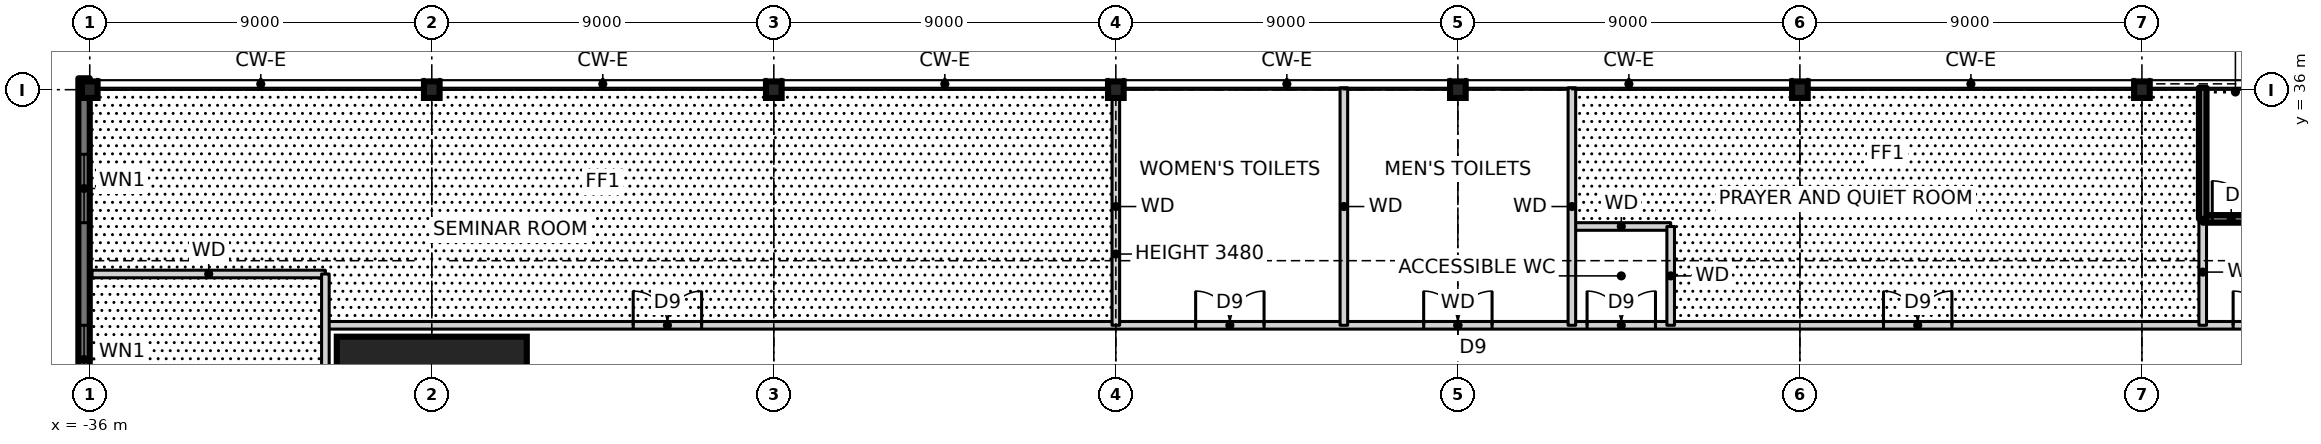
"""IFC4 building model, lengths in metres.
Left out: names, types, materials, properties, quantities, classifications, styles, units other than length and angle.
Written with IfcOpenShell. Run it as: python <this file> out.ifc"""

import sys

from ifc_helpers import new_model, si_unit, direction, frame, frame_2d, origin, origin_2d, place, context, subcontext, project, spatial, rectangle, i_section, extrude, element, fill, save


model = new_model("IFC4")
c1 = context("Model", 3, precision=1e-05, world=origin(), true_north=direction((0.0, 1.0)))
c2 = subcontext(c1, "Body", "Model", "MODEL_VIEW")
j1 = project(units=[si_unit("LENGTHUNIT", "METRE"), si_unit("PLANEANGLEUNIT", "RADIAN")], contexts=[c1])
p1 = place(None, origin())
s1 = spatial("IfcSite", under=j1, at=p1, CompositionType="ELEMENT")
p2 = place(p1, origin())
s2 = spatial("IfcBuilding", under=s1, at=p2, CompositionType="ELEMENT")
p3 = place(p2, frame((0.0, 0.0, 6.0)))
s3 = spatial("IfcBuildingStorey", under=s2, at=p3, CompositionType="ELEMENT", Elevation=6.0)
p4 = place(p3, frame((-27.0, 27.0, 0.0), z_axis=(0.0, 0.0, 1.0), x_axis=(1.0, 0.0, 0.0)))
e1 = element("IfcColumn", 1, at=p4, inside=s3, PredefinedType="COLUMN", context=c2, shape_type="SweptSolid", body=[
    extrude(rectangle(XDim=5.0, YDim=5.0, at=origin_2d()), origin(), (0.0, 0.0, 1.0), 4.5),
    extrude(i_section(OverallWidth=0.478, OverallDepth=0.599, WebThickness=0.1, FlangeThickness=0.14, at=origin_2d()), origin(), (0.0, 0.0, 1.0), 4.5),
])
for number, where, z_axis, x_axis in (
    (2, (-36.0, 36.0, 0.0), (0.0, 0.0, 1.0), (1.0, 0.0, 0.0)),
    (3, (-27.0, 36.0, 0.0), (0.0, 0.0, 1.0), (1.0, 0.0, 0.0)),
    (4, (-18.0, 36.0, 0.0), (0.0, 0.0, 1.0), (1.0, 0.0, 0.0)),
    (5, (-9.0, 36.0, 0.0), (0.0, 0.0, 1.0), (1.0, 0.0, 0.0)),
    (6, (0.0, 36.0, 0.0), (0.0, 0.0, 1.0), (1.0, 0.0, 0.0)),
    (7, (9.0, 36.0, 0.0), (0.0, 0.0, 1.0), (1.0, 0.0, 0.0)),
    (8, (18.0, 36.0, 0.0), (0.0, 0.0, 1.0), (1.0, 0.0, 0.0)),
):
    element("IfcColumn", number, at=place(p3, frame(where, z_axis=z_axis, x_axis=x_axis)), inside=s3, PredefinedType="COLUMN", context=c2, shape_type="SweptSolid", body=[
        extrude(i_section(OverallWidth=0.411, OverallDepth=0.434, WebThickness=0.036, FlangeThickness=0.057, at=origin_2d()), origin(), (0.0, 0.0, 1.0), 4.5),
    ])
p5 = place(p3, frame((-36.15, 36.3, -0.25), z_axis=(0.0, 0.0, 1.0), x_axis=(0.0, -1.0, 0.0)))
e9 = element("IfcWall", 9, at=p5, inside=s3, PredefinedType="SOLIDWALL", context=c2, shape_type="SweptSolid", body=[
    extrude(rectangle(XDim=72.6, YDim=0.3, at=frame_2d((36.3, 0.0))), origin(), (0.0, 0.0, 1.0), 3.73),
])
p6 = place(p5, frame((2.0, 0.0, 1.15)))
e10 = element("IfcOpeningElement", 10, at=p6, cuts=e9, PredefinedType="OPENING", context=c2, shape_type="SweptSolid", body=[
    extrude(rectangle(XDim=1.8, YDim=2.4, at=frame_2d((0.9, 1.2))), frame((0.0, 0.16, 0.0), z_axis=(0.0, -1.0, 0.0), x_axis=(1.0, 0.0, 0.0)), (0.0, 0.0, 1.0), 0.32),
])
p7 = place(p5, frame((6.5, 0.0, 1.15)))
e11 = element("IfcOpeningElement", 11, at=p7, cuts=e9, PredefinedType="OPENING", context=c2, shape_type="SweptSolid", body=[
    extrude(rectangle(XDim=1.8, YDim=2.4, at=frame_2d((0.9, 1.2))), frame((0.0, 0.16, 0.0), z_axis=(0.0, -1.0, 0.0), x_axis=(1.0, 0.0, 0.0)), (0.0, 0.0, 1.0), 0.32),
])
p8 = place(p5, frame((11.0, 0.0, 1.15)))
e12 = element("IfcOpeningElement", 12, at=p8, cuts=e9, PredefinedType="OPENING", context=c2, shape_type="SweptSolid", body=[
    extrude(rectangle(XDim=1.8, YDim=2.4, at=frame_2d((0.9, 1.2))), frame((0.0, 0.16, 0.0), z_axis=(0.0, -1.0, 0.0), x_axis=(1.0, 0.0, 0.0)), (0.0, 0.0, 1.0), 0.32),
])
p9 = place(p5, frame((15.5, 0.0, 1.15)))
e13 = element("IfcOpeningElement", 13, at=p9, cuts=e9, PredefinedType="OPENING", context=c2, shape_type="SweptSolid", body=[
    extrude(rectangle(XDim=1.8, YDim=2.4, at=frame_2d((0.9, 1.2))), frame((0.0, 0.16, 0.0), z_axis=(0.0, -1.0, 0.0), x_axis=(1.0, 0.0, 0.0)), (0.0, 0.0, 1.0), 0.32),
])
p10 = place(p5, frame((20.0, 0.0, 1.15)))
e14 = element("IfcOpeningElement", 14, at=p10, cuts=e9, PredefinedType="OPENING", context=c2, shape_type="SweptSolid", body=[
    extrude(rectangle(XDim=1.8, YDim=2.4, at=frame_2d((0.9, 1.2))), frame((0.0, 0.16, 0.0), z_axis=(0.0, -1.0, 0.0), x_axis=(1.0, 0.0, 0.0)), (0.0, 0.0, 1.0), 0.32),
])
p11 = place(p5, frame((24.5, 0.0, 1.15)))
e15 = element("IfcOpeningElement", 15, at=p11, cuts=e9, PredefinedType="OPENING", context=c2, shape_type="SweptSolid", body=[
    extrude(rectangle(XDim=1.8, YDim=2.4, at=frame_2d((0.9, 1.2))), frame((0.0, 0.16, 0.0), z_axis=(0.0, -1.0, 0.0), x_axis=(1.0, 0.0, 0.0)), (0.0, 0.0, 1.0), 0.32),
])
p12 = place(p5, frame((29.0, 0.0, 1.15)))
e16 = element("IfcOpeningElement", 16, at=p12, cuts=e9, PredefinedType="OPENING", context=c2, shape_type="SweptSolid", body=[
    extrude(rectangle(XDim=1.8, YDim=2.4, at=frame_2d((0.9, 1.2))), frame((0.0, 0.16, 0.0), z_axis=(0.0, -1.0, 0.0), x_axis=(1.0, 0.0, 0.0)), (0.0, 0.0, 1.0), 0.32),
])
p13 = place(p5, frame((42.5, 0.0, 1.15)))
e17 = element("IfcOpeningElement", 17, at=p13, cuts=e9, PredefinedType="OPENING", context=c2, shape_type="SweptSolid", body=[
    extrude(rectangle(XDim=1.8, YDim=2.4, at=frame_2d((0.9, 1.2))), frame((0.0, 0.16, 0.0), z_axis=(0.0, -1.0, 0.0), x_axis=(1.0, 0.0, 0.0)), (0.0, 0.0, 1.0), 0.32),
])
p14 = place(p5, frame((47.0, 0.0, 1.15)))
e18 = element("IfcOpeningElement", 18, at=p14, cuts=e9, PredefinedType="OPENING", context=c2, shape_type="SweptSolid", body=[
    extrude(rectangle(XDim=1.8, YDim=2.4, at=frame_2d((0.9, 1.2))), frame((0.0, 0.16, 0.0), z_axis=(0.0, -1.0, 0.0), x_axis=(1.0, 0.0, 0.0)), (0.0, 0.0, 1.0), 0.32),
])
p15 = place(p5, frame((51.5, 0.0, 1.15)))
e19 = element("IfcOpeningElement", 19, at=p15, cuts=e9, PredefinedType="OPENING", context=c2, shape_type="SweptSolid", body=[
    extrude(rectangle(XDim=1.8, YDim=2.4, at=frame_2d((0.9, 1.2))), frame((0.0, 0.16, 0.0), z_axis=(0.0, -1.0, 0.0), x_axis=(1.0, 0.0, 0.0)), (0.0, 0.0, 1.0), 0.32),
])
p16 = place(p5, frame((56.0, 0.0, 1.15)))
e20 = element("IfcOpeningElement", 20, at=p16, cuts=e9, PredefinedType="OPENING", context=c2, shape_type="SweptSolid", body=[
    extrude(rectangle(XDim=1.8, YDim=2.4, at=frame_2d((0.9, 1.2))), frame((0.0, 0.16, 0.0), z_axis=(0.0, -1.0, 0.0), x_axis=(1.0, 0.0, 0.0)), (0.0, 0.0, 1.0), 0.32),
])
p17 = place(p5, frame((60.5, 0.0, 1.15)))
e21 = element("IfcOpeningElement", 21, at=p17, cuts=e9, PredefinedType="OPENING", context=c2, shape_type="SweptSolid", body=[
    extrude(rectangle(XDim=1.8, YDim=2.4, at=frame_2d((0.9, 1.2))), frame((0.0, 0.16, 0.0), z_axis=(0.0, -1.0, 0.0), x_axis=(1.0, 0.0, 0.0)), (0.0, 0.0, 1.0), 0.32),
])
p18 = place(p5, frame((65.0, 0.0, 1.15)))
e22 = element("IfcOpeningElement", 22, at=p18, cuts=e9, PredefinedType="OPENING", context=c2, shape_type="SweptSolid", body=[
    extrude(rectangle(XDim=1.8, YDim=2.4, at=frame_2d((0.9, 1.2))), frame((0.0, 0.16, 0.0), z_axis=(0.0, -1.0, 0.0), x_axis=(1.0, 0.0, 0.0)), (0.0, 0.0, 1.0), 0.32),
])
p19 = place(p5, frame((69.5, 0.0, 1.15)))
e23 = element("IfcOpeningElement", 23, at=p19, cuts=e9, PredefinedType="OPENING", context=c2, shape_type="SweptSolid", body=[
    extrude(rectangle(XDim=1.8, YDim=2.4, at=frame_2d((0.9, 1.2))), frame((0.0, 0.16, 0.0), z_axis=(0.0, -1.0, 0.0), x_axis=(1.0, 0.0, 0.0)), (0.0, 0.0, 1.0), 0.32),
])
p20 = place(p3, frame((-29.8, 29.8, 0.0), z_axis=(0.0, 0.0, 1.0), x_axis=(1.0, 0.0, 0.0)))
e24 = element("IfcWall", 24, at=p20, inside=s3, PredefinedType="SOLIDWALL", context=c2, shape_type="SweptSolid", body=[
    extrude(rectangle(XDim=59.6, YDim=0.2, at=frame_2d((29.8, 0.0))), origin(), (0.0, 0.0, 1.0), 4.25),
])
p21 = place(p20, frame((8.1, 0.0, 0.0)))
e25 = element("IfcOpeningElement", 25, at=p21, cuts=e24, PredefinedType="OPENING", context=c2, shape_type="SweptSolid", body=[
    extrude(rectangle(XDim=1.8, YDim=2.1, at=frame_2d((0.9, 1.05))), frame((0.0, 0.11, 0.0), z_axis=(0.0, -1.0, 0.0), x_axis=(1.0, 0.0, 0.0)), (0.0, 0.0, 1.0), 0.22),
])
p22 = place(p20, frame((22.9, 0.0, 0.0)))
e26 = element("IfcOpeningElement", 26, at=p22, cuts=e24, PredefinedType="OPENING", context=c2, shape_type="SweptSolid", body=[
    extrude(rectangle(XDim=1.8, YDim=2.1, at=frame_2d((0.9, 1.05))), frame((0.0, 0.11, 0.0), z_axis=(0.0, -1.0, 0.0), x_axis=(1.0, 0.0, 0.0)), (0.0, 0.0, 1.0), 0.22),
])
p23 = place(p20, frame((28.9, 0.0, 0.0)))
e27 = element("IfcOpeningElement", 27, at=p23, cuts=e24, PredefinedType="OPENING", context=c2, shape_type="SweptSolid", body=[
    extrude(rectangle(XDim=1.8, YDim=2.1, at=frame_2d((0.9, 1.05))), frame((0.0, 0.11, 0.0), z_axis=(0.0, -1.0, 0.0), x_axis=(1.0, 0.0, 0.0)), (0.0, 0.0, 1.0), 0.22),
])
p24 = place(p20, frame((33.2, 0.0, 0.0)))
e28 = element("IfcOpeningElement", 28, at=p24, cuts=e24, PredefinedType="OPENING", context=c2, shape_type="SweptSolid", body=[
    extrude(rectangle(XDim=1.8, YDim=2.1, at=frame_2d((0.9, 1.05))), frame((0.0, 0.11, 0.0), z_axis=(0.0, -1.0, 0.0), x_axis=(1.0, 0.0, 0.0)), (0.0, 0.0, 1.0), 0.22),
])
p25 = place(p20, frame((41.0, 0.0, 0.0)))
e29 = element("IfcOpeningElement", 29, at=p25, cuts=e24, PredefinedType="OPENING", context=c2, shape_type="SweptSolid", body=[
    extrude(rectangle(XDim=1.8, YDim=2.1, at=frame_2d((0.9, 1.05))), frame((0.0, 0.11, 0.0), z_axis=(0.0, -1.0, 0.0), x_axis=(1.0, 0.0, 0.0)), (0.0, 0.0, 1.0), 0.22),
])
p26 = place(p20, frame((50.2, 0.0, 0.0)))
e30 = element("IfcOpeningElement", 30, at=p26, cuts=e24, PredefinedType="OPENING", context=c2, shape_type="SweptSolid", body=[
    extrude(rectangle(XDim=1.8, YDim=2.1, at=frame_2d((0.9, 1.05))), frame((0.0, 0.11, 0.0), z_axis=(0.0, -1.0, 0.0), x_axis=(1.0, 0.0, 0.0)), (0.0, 0.0, 1.0), 0.22),
])
p27 = place(p3, frame((-35.94, 31.15, 0.0), z_axis=(0.0, 0.0, 1.0), x_axis=(1.0, 0.0, 0.0)))
e31 = element("IfcWall", 31, at=p27, inside=s3, PredefinedType="SOLIDWALL", context=c2, shape_type="SweptSolid", body=[
    extrude(rectangle(XDim=6.14, YDim=0.2, at=frame_2d((3.07, 0.0))), origin(), (0.0, 0.0, 1.0), 4.25),
])
p28 = place(p3, frame((3.0, 32.4, 0.0), z_axis=(0.0, 0.0, 1.0), x_axis=(1.0, 0.0, 0.0)))
e32 = element("IfcWall", 32, at=p28, inside=s3, PredefinedType="SOLIDWALL", context=c2, shape_type="SweptSolid", body=[
    extrude(rectangle(XDim=2.6, YDim=0.2, at=frame_2d((1.3, 0.0))), origin(), (0.0, 0.0, 1.0), 4.25),
])
p29 = place(p3, frame((19.6, 32.6, 0.0), z_axis=(0.0, 0.0, 1.0), x_axis=(1.0, 0.0, 0.0)))
e33 = element("IfcWall", 33, at=p29, inside=s3, PredefinedType="SOLIDWALL", context=c2, shape_type="SweptSolid", body=[
    extrude(rectangle(XDim=7.4, YDim=0.2, at=frame_2d((3.7, 0.0))), origin(), (0.0, 0.0, 1.0), 4.5),
])
p30 = place(p29, frame((0.25, 0.0, 0.0)))
e34 = element("IfcOpeningElement", 34, at=p30, cuts=e33, PredefinedType="OPENING", context=c2, shape_type="SweptSolid", body=[
    extrude(rectangle(XDim=1.0, YDim=2.1, at=frame_2d((0.5, 1.05))), frame((0.0, 0.11, 0.0), z_axis=(0.0, -1.0, 0.0), x_axis=(1.0, 0.0, 0.0)), (0.0, 0.0, 1.0), 0.22),
])
p31 = place(p3, frame((19.6, 29.8, 0.0), z_axis=(0.0, 0.0, 1.0), x_axis=(0.0, 1.0, 0.0)))
e35 = element("IfcWall", 35, at=p31, inside=s3, PredefinedType="SOLIDWALL", context=c2, shape_type="SweptSolid", body=[
    extrude(rectangle(XDim=2.8, YDim=0.2, at=frame_2d((1.4, 0.0))), origin(), (0.0, 0.0, 1.0), 4.25),
])
p32 = place(p3, frame((19.6, 32.6, 0.0), z_axis=(0.0, 0.0, 1.0), x_axis=(0.0, 1.0, 0.0)))
e36 = element("IfcWall", 36, at=p32, inside=s3, PredefinedType="SOLIDWALL", context=c2, shape_type="SweptSolid", body=[
    extrude(rectangle(XDim=3.45, YDim=0.2, at=frame_2d((1.725, 0.0))), origin(), (0.0, 0.0, 1.0), 4.5),
])
p33 = place(p3, frame((5.6, 29.8, 0.0), z_axis=(0.0, 0.0, 1.0), x_axis=(0.0, 1.0, 0.0)))
e37 = element("IfcWall", 37, at=p33, inside=s3, PredefinedType="SOLIDWALL", context=c2, shape_type="SweptSolid", body=[
    extrude(rectangle(XDim=2.6, YDim=0.2, at=frame_2d((1.3, 0.0))), origin(), (0.0, 0.0, 1.0), 4.25),
])
for number, where, z_axis, x_axis in (
    (38, (3.0, 29.8, 0.0), (0.0, 0.0, 1.0), (0.0, 1.0, 0.0)),
    (39, (-3.0, 29.8, 0.0), (0.0, 0.0, 1.0), (0.0, 1.0, 0.0)),
):
    element("IfcWall", number, at=place(p3, frame(where, z_axis=z_axis, x_axis=x_axis)), inside=s3, PredefinedType="SOLIDWALL", context=c2, shape_type="SweptSolid", body=[
        extrude(rectangle(XDim=6.25, YDim=0.2, at=frame_2d((3.125, 0.0))), origin(), (0.0, 0.0, 1.0), 4.25),
    ])
p34 = place(p3, frame((-9.0, 29.8, 0.0), z_axis=(0.0, 0.0, 1.0), x_axis=(0.0, 1.0, 0.0)))
e40 = element("IfcWall", 40, at=p34, inside=s3, PredefinedType="SOLIDWALL", context=c2, shape_type="SweptSolid", body=[
    extrude(rectangle(XDim=6.25, YDim=0.2, at=frame_2d((3.125, 0.0))), origin(), (0.0, 0.0, 1.0), 3.48),
])
p35 = place(p3, frame((-29.8, -31.4, 0.0), z_axis=(0.0, 0.0, 1.0), x_axis=(0.0, 1.0, 0.0)))
e41 = element("IfcWall", 41, at=p35, inside=s3, PredefinedType="SOLIDWALL", context=c2, shape_type="SweptSolid", body=[
    extrude(rectangle(XDim=62.55, YDim=0.2, at=frame_2d((31.275, 0.0))), origin(), (0.0, 0.0, 1.0), 4.25),
])
p36 = place(p35, frame((8.9, 0.0, 0.0)))
e42 = element("IfcOpeningElement", 42, at=p36, cuts=e41, PredefinedType="OPENING", context=c2, shape_type="SweptSolid", body=[
    extrude(rectangle(XDim=1.8, YDim=2.1, at=frame_2d((0.9, 1.05))), frame((0.0, 0.11, 0.0), z_axis=(0.0, -1.0, 0.0), x_axis=(1.0, 0.0, 0.0)), (0.0, 0.0, 1.0), 0.22),
])
p37 = place(p35, frame((19.3, 0.0, 0.0)))
e43 = element("IfcOpeningElement", 43, at=p37, cuts=e41, PredefinedType="OPENING", context=c2, shape_type="SweptSolid", body=[
    extrude(rectangle(XDim=1.8, YDim=2.1, at=frame_2d((0.9, 1.05))), frame((0.0, 0.11, 0.0), z_axis=(0.0, -1.0, 0.0), x_axis=(1.0, 0.0, 0.0)), (0.0, 0.0, 1.0), 0.22),
])
p38 = place(p35, frame((24.15, 0.0, 0.0)))
e44 = element("IfcOpeningElement", 44, at=p38, cuts=e41, PredefinedType="OPENING", context=c2, shape_type="SweptSolid", body=[
    extrude(rectangle(XDim=1.8, YDim=2.1, at=frame_2d((0.9, 1.05))), frame((0.0, 0.11, 0.0), z_axis=(0.0, -1.0, 0.0), x_axis=(1.0, 0.0, 0.0)), (0.0, 0.0, 1.0), 0.22),
])
p39 = place(p35, frame((30.5, 0.0, 0.0)))
e45 = element("IfcOpeningElement", 45, at=p39, cuts=e41, PredefinedType="OPENING", context=c2, shape_type="SweptSolid", body=[
    extrude(rectangle(XDim=1.8, YDim=2.1, at=frame_2d((0.9, 1.05))), frame((0.0, 0.11, 0.0), z_axis=(0.0, -1.0, 0.0), x_axis=(1.0, 0.0, 0.0)), (0.0, 0.0, 1.0), 0.22),
])
p40 = place(p35, frame((36.85, 0.0, 0.0)))
e46 = element("IfcOpeningElement", 46, at=p40, cuts=e41, PredefinedType="OPENING", context=c2, shape_type="SweptSolid", body=[
    extrude(rectangle(XDim=1.8, YDim=2.1, at=frame_2d((0.9, 1.05))), frame((0.0, 0.11, 0.0), z_axis=(0.0, -1.0, 0.0), x_axis=(1.0, 0.0, 0.0)), (0.0, 0.0, 1.0), 0.22),
])
p41 = place(p35, frame((51.3, 0.0, 0.0)))
e47 = element("IfcOpeningElement", 47, at=p41, cuts=e41, PredefinedType="OPENING", context=c2, shape_type="SweptSolid", body=[
    extrude(rectangle(XDim=1.8, YDim=2.1, at=frame_2d((0.9, 1.05))), frame((0.0, 0.11, 0.0), z_axis=(0.0, -1.0, 0.0), x_axis=(1.0, 0.0, 0.0)), (0.0, 0.0, 1.0), 0.22),
])
p42 = place(p6, origin())
e48 = element("IfcWindow", 48, at=p42, inside=s3, PartitioningType="SINGLE_PANEL", PredefinedType="WINDOW", context=c2, shape_type="SweptSolid", body=[
    extrude(rectangle(XDim=1.8, YDim=2.4, at=frame_2d((0.9, 1.2))), frame((0.0, 0.03, 0.0), z_axis=(0.0, -1.0, 0.0), x_axis=(1.0, 0.0, 0.0)), (0.0, 0.0, 1.0), 0.06),
])
fill(e10, e48)
p43 = place(p7, origin())
e49 = element("IfcWindow", 49, at=p43, inside=s3, PartitioningType="SINGLE_PANEL", PredefinedType="WINDOW", context=c2, shape_type="SweptSolid", body=[
    extrude(rectangle(XDim=1.8, YDim=2.4, at=frame_2d((0.9, 1.2))), frame((0.0, 0.03, 0.0), z_axis=(0.0, -1.0, 0.0), x_axis=(1.0, 0.0, 0.0)), (0.0, 0.0, 1.0), 0.06),
])
fill(e11, e49)
p44 = place(p21, origin())
e50 = element("IfcDoor", 50, at=p44, inside=s3, OperationType="DOUBLE_DOOR_SINGLE_SWING", PredefinedType="DOOR", context=c2, shape_type="SweptSolid", body=[
    extrude(rectangle(XDim=1.8, YDim=2.1, at=frame_2d((0.9, 1.05))), frame((0.0, 0.025, 0.0), z_axis=(0.0, -1.0, 0.0), x_axis=(1.0, 0.0, 0.0)), (0.0, 0.0, 1.0), 0.05),
])
fill(e25, e50)
p45 = place(p22, origin())
e51 = element("IfcDoor", 51, at=p45, inside=s3, OperationType="DOUBLE_DOOR_SINGLE_SWING", PredefinedType="DOOR", context=c2, shape_type="SweptSolid", body=[
    extrude(rectangle(XDim=1.8, YDim=2.1, at=frame_2d((0.9, 1.05))), frame((0.0, 0.025, 0.0), z_axis=(0.0, -1.0, 0.0), x_axis=(1.0, 0.0, 0.0)), (0.0, 0.0, 1.0), 0.05),
])
fill(e26, e51)
p46 = place(p23, origin())
e52 = element("IfcDoor", 52, at=p46, inside=s3, OperationType="DOUBLE_DOOR_SINGLE_SWING", PredefinedType="DOOR", context=c2, shape_type="SweptSolid", body=[
    extrude(rectangle(XDim=1.8, YDim=2.1, at=frame_2d((0.9, 1.05))), frame((0.0, 0.025, 0.0), z_axis=(0.0, -1.0, 0.0), x_axis=(1.0, 0.0, 0.0)), (0.0, 0.0, 1.0), 0.05),
])
fill(e27, e52)
p47 = place(p24, origin())
e53 = element("IfcDoor", 53, at=p47, inside=s3, OperationType="DOUBLE_DOOR_SINGLE_SWING", PredefinedType="DOOR", context=c2, shape_type="SweptSolid", body=[
    extrude(rectangle(XDim=1.8, YDim=2.1, at=frame_2d((0.9, 1.05))), frame((0.0, 0.025, 0.0), z_axis=(0.0, -1.0, 0.0), x_axis=(1.0, 0.0, 0.0)), (0.0, 0.0, 1.0), 0.05),
])
fill(e28, e53)
p48 = place(p25, origin())
e54 = element("IfcDoor", 54, at=p48, inside=s3, OperationType="DOUBLE_DOOR_SINGLE_SWING", PredefinedType="DOOR", context=c2, shape_type="SweptSolid", body=[
    extrude(rectangle(XDim=1.8, YDim=2.1, at=frame_2d((0.9, 1.05))), frame((0.0, 0.025, 0.0), z_axis=(0.0, -1.0, 0.0), x_axis=(1.0, 0.0, 0.0)), (0.0, 0.0, 1.0), 0.05),
])
fill(e29, e54)
p49 = place(p26, origin())
e55 = element("IfcDoor", 55, at=p49, inside=s3, OperationType="DOUBLE_DOOR_SINGLE_SWING", PredefinedType="DOOR", context=c2, shape_type="SweptSolid", body=[
    extrude(rectangle(XDim=1.8, YDim=2.1, at=frame_2d((0.9, 1.05))), frame((0.0, 0.025, 0.0), z_axis=(0.0, -1.0, 0.0), x_axis=(1.0, 0.0, 0.0)), (0.0, 0.0, 1.0), 0.05),
])
fill(e30, e55)
p50 = place(p30, origin())
e56 = element("IfcDoor", 56, at=p50, inside=s3, OperationType="SINGLE_SWING_LEFT", PredefinedType="DOOR", context=c2, shape_type="SweptSolid", body=[
    extrude(rectangle(XDim=1.0, YDim=2.1, at=frame_2d((0.5, 1.05))), frame((0.0, 0.025, 0.0), z_axis=(0.0, -1.0, 0.0), x_axis=(1.0, 0.0, 0.0)), (0.0, 0.0, 1.0), 0.05),
])
fill(e34, e56)
save(model, sys.argv[1])
